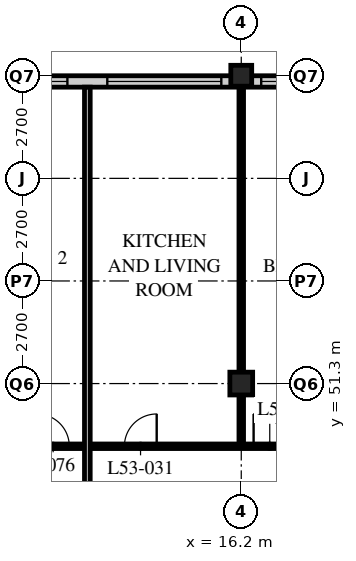
"""IFC4 building model, lengths in metres.
Left out: names, types, materials, properties, quantities, classifications, styles, units other than length and angle.
Written with IfcOpenShell. Run it as: python <this file> out.ifc"""

import sys

from ifc_helpers import new_model, si_unit, direction, frame, frame_2d, origin, origin_2d, place, context, subcontext, project, spatial, rectangle, hollow_rectangle, extrude, element, fill, save


model = new_model("IFC4")
c1 = context("Model", 3, precision=1e-05, world=origin(), true_north=direction((0.0, 1.0)))
c2 = subcontext(c1, "Body", "Model", "MODEL_VIEW")
j1 = project(units=[si_unit("LENGTHUNIT", "METRE"), si_unit("PLANEANGLEUNIT", "RADIAN")], contexts=[c1])
p1 = place(None, origin())
s1 = spatial("IfcSite", under=j1, at=p1, CompositionType="ELEMENT")
p2 = place(p1, origin())
s2 = spatial("IfcBuilding", under=s1, at=p2, CompositionType="ELEMENT")
p3 = place(p2, frame((0.0, 0.0, 206.4)))
s3 = spatial("IfcBuildingStorey", under=s2, at=p3, CompositionType="ELEMENT", Elevation=206.4)
p4 = place(p3, frame((16.2, 51.3, 0.0), z_axis=(0.0, 0.0, 1.0), x_axis=(1.0, 0.0, 0.0)))
e1 = element("IfcColumn", 1, at=p4, inside=s3, PredefinedType="COLUMN", context=c2, shape_type="SweptSolid", body=[
    extrude(hollow_rectangle(XDim=0.6, YDim=0.6, WallThickness=0.05, at=origin_2d()), origin(), (0.0, 0.0, 1.0), 3.6),
])
p5 = place(p3, frame((16.2, 59.4, 0.0), z_axis=(0.0, 0.0, 1.0), x_axis=(1.0, 0.0, 0.0)))
e2 = element("IfcColumn", 2, at=p5, inside=s3, PredefinedType="COLUMN", context=c2, shape_type="SweptSolid", body=[
    extrude(hollow_rectangle(XDim=0.55, YDim=0.55, WallThickness=0.045, at=origin_2d()), origin(), (0.0, 0.0, 1.0), 3.6),
])
p6 = place(p3, frame((48.3, 59.25, 0.0), z_axis=(0.0, 0.0, 1.0), x_axis=(-1.0, 0.0, 0.0)))
e3 = element("IfcWall", 3, at=p6, inside=s3, PredefinedType="SOLIDWALL", context=c2, shape_type="SweptSolid", body=[
    extrude(rectangle(XDim=40.2, YDim=0.3, at=frame_2d((20.1, 0.0))), origin(), (0.0, 0.0, 1.0), 3.39),
])
p7 = place(p6, frame((0.225, 0.0, 0.6)))
e4 = element("IfcOpeningElement", 4, at=p7, cuts=e3, PredefinedType="OPENING", context=c2, shape_type="SweptSolid", body=[
    extrude(rectangle(XDim=3.0, YDim=2.4, at=frame_2d((1.5, 1.2))), frame((0.0, 0.16, 0.0), z_axis=(0.0, -1.0, 0.0), x_axis=(1.0, 0.0, 0.0)), (0.0, 0.0, 1.0), 0.32),
])
p8 = place(p6, frame((4.275, 0.0, 0.6)))
e5 = element("IfcOpeningElement", 5, at=p8, cuts=e3, PredefinedType="OPENING", context=c2, shape_type="SweptSolid", body=[
    extrude(rectangle(XDim=3.0, YDim=2.4, at=frame_2d((1.5, 1.2))), frame((0.0, 0.16, 0.0), z_axis=(0.0, -1.0, 0.0), x_axis=(1.0, 0.0, 0.0)), (0.0, 0.0, 1.0), 0.32),
])
p9 = place(p6, frame((8.325, 0.0, 0.6)))
e6 = element("IfcOpeningElement", 6, at=p9, cuts=e3, PredefinedType="OPENING", context=c2, shape_type="SweptSolid", body=[
    extrude(rectangle(XDim=3.0, YDim=2.4, at=frame_2d((1.5, 1.2))), frame((0.0, 0.16, 0.0), z_axis=(0.0, -1.0, 0.0), x_axis=(1.0, 0.0, 0.0)), (0.0, 0.0, 1.0), 0.32),
])
p10 = place(p6, frame((12.375, 0.0, 0.6)))
e7 = element("IfcOpeningElement", 7, at=p10, cuts=e3, PredefinedType="OPENING", context=c2, shape_type="SweptSolid", body=[
    extrude(rectangle(XDim=3.0, YDim=2.4, at=frame_2d((1.5, 1.2))), frame((0.0, 0.16, 0.0), z_axis=(0.0, -1.0, 0.0), x_axis=(1.0, 0.0, 0.0)), (0.0, 0.0, 1.0), 0.32),
])
p11 = place(p6, frame((16.425, 0.0, 0.6)))
e8 = element("IfcOpeningElement", 8, at=p11, cuts=e3, PredefinedType="OPENING", context=c2, shape_type="SweptSolid", body=[
    extrude(rectangle(XDim=3.0, YDim=2.4, at=frame_2d((1.5, 1.2))), frame((0.0, 0.16, 0.0), z_axis=(0.0, -1.0, 0.0), x_axis=(1.0, 0.0, 0.0)), (0.0, 0.0, 1.0), 0.32),
])
p12 = place(p6, frame((20.475, 0.0, 0.6)))
e9 = element("IfcOpeningElement", 9, at=p12, cuts=e3, PredefinedType="OPENING", context=c2, shape_type="SweptSolid", body=[
    extrude(rectangle(XDim=3.0, YDim=2.4, at=frame_2d((1.5, 1.2))), frame((0.0, 0.16, 0.0), z_axis=(0.0, -1.0, 0.0), x_axis=(1.0, 0.0, 0.0)), (0.0, 0.0, 1.0), 0.32),
])
p13 = place(p6, frame((24.525, 0.0, 0.6)))
e10 = element("IfcOpeningElement", 10, at=p13, cuts=e3, PredefinedType="OPENING", context=c2, shape_type="SweptSolid", body=[
    extrude(rectangle(XDim=3.0, YDim=2.4, at=frame_2d((1.5, 1.2))), frame((0.0, 0.16, 0.0), z_axis=(0.0, -1.0, 0.0), x_axis=(1.0, 0.0, 0.0)), (0.0, 0.0, 1.0), 0.32),
])
p14 = place(p6, frame((28.575, 0.0, 0.6)))
e11 = element("IfcOpeningElement", 11, at=p14, cuts=e3, PredefinedType="OPENING", context=c2, shape_type="SweptSolid", body=[
    extrude(rectangle(XDim=3.0, YDim=2.4, at=frame_2d((1.5, 1.2))), frame((0.0, 0.16, 0.0), z_axis=(0.0, -1.0, 0.0), x_axis=(1.0, 0.0, 0.0)), (0.0, 0.0, 1.0), 0.32),
])
p15 = place(p6, frame((32.625, 0.0, 0.6)))
e12 = element("IfcOpeningElement", 12, at=p15, cuts=e3, PredefinedType="OPENING", context=c2, shape_type="SweptSolid", body=[
    extrude(rectangle(XDim=3.0, YDim=2.4, at=frame_2d((1.5, 1.2))), frame((0.0, 0.16, 0.0), z_axis=(0.0, -1.0, 0.0), x_axis=(1.0, 0.0, 0.0)), (0.0, 0.0, 1.0), 0.32),
])
p16 = place(p6, frame((36.675, 0.0, 0.6)))
e13 = element("IfcOpeningElement", 13, at=p16, cuts=e3, PredefinedType="OPENING", context=c2, shape_type="SweptSolid", body=[
    extrude(rectangle(XDim=3.0, YDim=2.4, at=frame_2d((1.5, 1.2))), frame((0.0, 0.16, 0.0), z_axis=(0.0, -1.0, 0.0), x_axis=(1.0, 0.0, 0.0)), (0.0, 0.0, 1.0), 0.32),
])
p17 = place(p3, frame((16.2, 49.65, 0.0), z_axis=(0.0, 0.0, 1.0), x_axis=(0.0, 1.0, 0.0)))
e14 = element("IfcWall", 14, at=p17, inside=s3, PredefinedType="PARTITIONING", context=c2, shape_type="SweptSolid", body=[
    extrude(rectangle(XDim=9.45, YDim=0.12, at=frame_2d((4.725, 0.0))), origin(), (0.0, 0.0, 1.0), 2.778),
])
p18 = place(p3, frame((4.1, 49.65, 0.0), z_axis=(0.0, 0.0, 1.0), x_axis=(1.0, 0.0, 0.0)))
e15 = element("IfcWall", 15, at=p18, inside=s3, PredefinedType="PARTITIONING", context=c2, shape_type="SweptSolid", body=[
    extrude(rectangle(XDim=32.35, YDim=0.12, at=frame_2d((16.175, 0.0))), origin(), (0.0, 0.0, 1.0), 3.39),
])
p19 = place(p18, frame((9.025, 0.0, 0.0)))
e16 = element("IfcOpeningElement", 16, at=p19, cuts=e15, PredefinedType="OPENING", context=c2, shape_type="SweptSolid", body=[
    extrude(rectangle(XDim=0.85, YDim=2.1, at=frame_2d((0.425, 1.05))), frame((0.0, 0.07, 0.0), z_axis=(0.0, -1.0, 0.0), x_axis=(1.0, 0.0, 0.0)), (0.0, 0.0, 1.0), 0.14),
])
p20 = place(p18, frame((12.425, 0.0, 0.0)))
e17 = element("IfcOpeningElement", 17, at=p20, cuts=e15, PredefinedType="OPENING", context=c2, shape_type="SweptSolid", body=[
    extrude(rectangle(XDim=0.85, YDim=2.1, at=frame_2d((0.425, 1.05))), frame((0.0, 0.07, 0.0), z_axis=(0.0, -1.0, 0.0), x_axis=(1.0, 0.0, 0.0)), (0.0, 0.0, 1.0), 0.14),
])
p21 = place(p18, frame((17.125, 0.0, 0.0)))
e18 = element("IfcOpeningElement", 18, at=p21, cuts=e15, PredefinedType="OPENING", context=c2, shape_type="SweptSolid", body=[
    extrude(rectangle(XDim=0.85, YDim=2.1, at=frame_2d((0.425, 1.05))), frame((0.0, 0.07, 0.0), z_axis=(0.0, -1.0, 0.0), x_axis=(1.0, 0.0, 0.0)), (0.0, 0.0, 1.0), 0.14),
])
p22 = place(p18, frame((24.575, 0.0, 0.0)))
e19 = element("IfcOpeningElement", 19, at=p22, cuts=e15, PredefinedType="OPENING", context=c2, shape_type="SweptSolid", body=[
    extrude(rectangle(XDim=0.85, YDim=2.1, at=frame_2d((0.425, 1.05))), frame((0.0, 0.07, 0.0), z_axis=(0.0, -1.0, 0.0), x_axis=(1.0, 0.0, 0.0)), (0.0, 0.0, 1.0), 0.14),
])
p23 = place(p18, frame((28.625, 0.0, 0.0)))
e20 = element("IfcOpeningElement", 20, at=p23, cuts=e15, PredefinedType="OPENING", context=c2, shape_type="SweptSolid", body=[
    extrude(rectangle(XDim=0.85, YDim=2.1, at=frame_2d((0.425, 1.05))), frame((0.0, 0.07, 0.0), z_axis=(0.0, -1.0, 0.0), x_axis=(1.0, 0.0, 0.0)), (0.0, 0.0, 1.0), 0.14),
])
p24 = place(p18, frame((6.725, 0.0, 0.0)))
e21 = element("IfcOpeningElement", 21, at=p24, cuts=e15, PredefinedType="OPENING", context=c2, shape_type="SweptSolid", body=[
    extrude(rectangle(XDim=0.85, YDim=2.1, at=frame_2d((0.425, 1.05))), frame((0.0, 0.07, 0.0), z_axis=(0.0, -1.0, 0.0), x_axis=(1.0, 0.0, 0.0)), (0.0, 0.0, 1.0), 0.14),
])
p25 = place(p18, frame((2.875, 0.0, 0.0)))
e22 = element("IfcOpeningElement", 22, at=p25, cuts=e15, PredefinedType="OPENING", context=c2, shape_type="SweptSolid", body=[
    extrude(rectangle(XDim=0.85, YDim=2.1, at=frame_2d((0.425, 1.05))), frame((0.0, 0.07, 0.0), z_axis=(0.0, -1.0, 0.0), x_axis=(1.0, 0.0, 0.0)), (0.0, 0.0, 1.0), 0.14),
])
p26 = place(p3, frame((12.15, 47.25, 0.0), z_axis=(0.0, 0.0, 1.0), x_axis=(0.0, 1.0, 0.0)))
e23 = element("IfcWall", 23, at=p26, inside=s3, PredefinedType="PARTITIONING", context=c2, shape_type="SweptSolid", body=[
    extrude(rectangle(XDim=11.85, YDim=0.15, at=frame_2d((5.925, 0.0))), origin(), (0.0, 0.0, 1.0), 3.39),
])
p27 = place(p14, origin())
e24 = element("IfcWindow", 24, at=p27, inside=s3, PartitioningType="SINGLE_PANEL", PredefinedType="WINDOW", context=c2, shape_type="SweptSolid", body=[
    extrude(rectangle(XDim=3.0, YDim=2.4, at=frame_2d((1.5, 1.2))), frame((0.0, 0.03, 0.0), z_axis=(0.0, -1.0, 0.0), x_axis=(1.0, 0.0, 0.0)), (0.0, 0.0, 1.0), 0.06),
])
fill(e11, e24)
p28 = place(p15, origin())
e25 = element("IfcWindow", 25, at=p28, inside=s3, PartitioningType="SINGLE_PANEL", PredefinedType="WINDOW", context=c2, shape_type="SweptSolid", body=[
    extrude(rectangle(XDim=3.0, YDim=2.4, at=frame_2d((1.5, 1.2))), frame((0.0, 0.03, 0.0), z_axis=(0.0, -1.0, 0.0), x_axis=(1.0, 0.0, 0.0)), (0.0, 0.0, 1.0), 0.06),
])
fill(e12, e25)
p29 = place(p16, origin())
e26 = element("IfcWindow", 26, at=p29, inside=s3, PartitioningType="SINGLE_PANEL", PredefinedType="WINDOW", context=c2, shape_type="SweptSolid", body=[
    extrude(rectangle(XDim=3.0, YDim=2.4, at=frame_2d((1.5, 1.2))), frame((0.0, 0.03, 0.0), z_axis=(0.0, -1.0, 0.0), x_axis=(1.0, 0.0, 0.0)), (0.0, 0.0, 1.0), 0.06),
])
fill(e13, e26)
p30 = place(p19, origin())
e27 = element("IfcDoor", 27, at=p30, inside=s3, OperationType="SINGLE_SWING_RIGHT", PredefinedType="DOOR", context=c2, shape_type="SweptSolid", body=[
    extrude(rectangle(XDim=0.85, YDim=2.1, at=frame_2d((0.425, 1.05))), frame((0.0, 0.025, 0.0), z_axis=(0.0, -1.0, 0.0), x_axis=(1.0, 0.0, 0.0)), (0.0, 0.0, 1.0), 0.05),
])
fill(e16, e27)
p31 = place(p20, origin())
e28 = element("IfcDoor", 28, at=p31, inside=s3, OperationType="SINGLE_SWING_LEFT", PredefinedType="DOOR", context=c2, shape_type="SweptSolid", body=[
    extrude(rectangle(XDim=0.85, YDim=2.1, at=frame_2d((0.425, 1.05))), frame((0.0, 0.025, 0.0), z_axis=(0.0, -1.0, 0.0), x_axis=(1.0, 0.0, 0.0)), (0.0, 0.0, 1.0), 0.05),
])
fill(e17, e28)
p32 = place(p24, origin())
e29 = element("IfcDoor", 29, at=p32, inside=s3, OperationType="SINGLE_SWING_LEFT", PredefinedType="DOOR", context=c2, shape_type="SweptSolid", body=[
    extrude(rectangle(XDim=0.85, YDim=2.1, at=frame_2d((0.425, 1.05))), frame((0.0, 0.025, 0.0), z_axis=(0.0, -1.0, 0.0), x_axis=(1.0, 0.0, 0.0)), (0.0, 0.0, 1.0), 0.05),
])
fill(e21, e29)
save(model, sys.argv[1])
